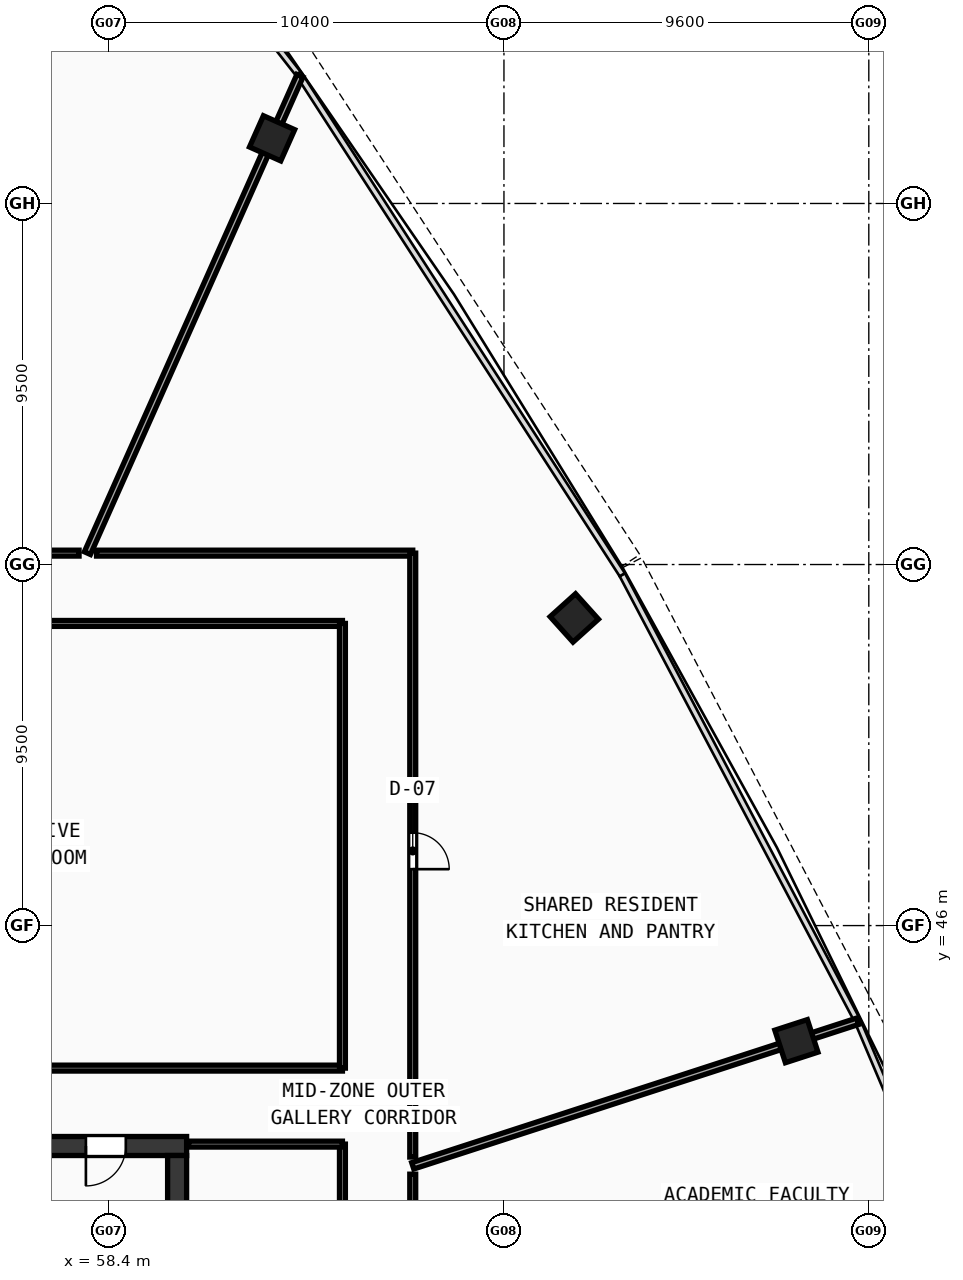
"""IFC4 building model, lengths in metres.
Left out: names, types, materials, properties, quantities, classifications, styles, units other than length and angle.
Written with IfcOpenShell. Run it as: python <this file> out.ifc"""

import sys

from ifc_helpers import new_model, si_unit, direction, frame, frame_2d, origin, origin_with_axes, origin_2d, place, context, subcontext, project, spatial, rectangle, hollow_rectangle, extrude, source, transform, mapped, element, fill, save


model = new_model("IFC4")
c1 = context("Model", 3, precision=1e-05, world=origin(), true_north=direction((0.0, 1.0)))
c2 = subcontext(c1, "Body", "Model", "MODEL_VIEW")
j1 = project(units=[si_unit("LENGTHUNIT", "METRE"), si_unit("PLANEANGLEUNIT", "RADIAN")], contexts=[c1])
p1 = place(None, origin())
s1 = spatial("IfcSite", under=j1, at=p1, CompositionType="ELEMENT")
p2 = place(p1, origin())
s2 = spatial("IfcBuilding", under=s1, at=p2, CompositionType="ELEMENT")
p3 = place(p2, frame((0.0, 0.0, 203.76)))
s3 = spatial("IfcBuildingStorey", under=s2, at=p3, CompositionType="ELEMENT", Elevation=203.76)
p4 = place(p3, frame((49.2, 40.2, 0.0), z_axis=(0.0, 0.0, 1.0), x_axis=(1.0, 0.0, 0.0)))
e1 = element("IfcWall", 1, at=p4, inside=s3, PredefinedType="SHEAR", context=c2, shape_type="SweptSolid", body=[
    extrude(rectangle(XDim=11.25, YDim=0.5, at=frame_2d((5.625, 0.0))), origin(), (0.0, 0.0, 1.0), 3.54),
])
p5 = place(p4, frame((8.6, 0.0, 0.0)))
e2 = element("IfcOpeningElement", 2, at=p5, cuts=e1, PredefinedType="OPENING", context=c2, shape_type="SweptSolid", body=[
    extrude(rectangle(XDim=1.05, YDim=2.1, at=frame_2d((0.525, 1.05))), frame((0.0, 0.26, 0.0), z_axis=(0.0, -1.0, 0.0), x_axis=(1.0, 0.0, 0.0)), (0.0, 0.0, 1.0), 0.52),
])
p6 = place(p3, frame((60.2, 27.75, 0.0), z_axis=(0.0, 0.0, 1.0), x_axis=(0.0, 1.0, 0.0)))
e3 = element("IfcWall", 3, at=p6, inside=s3, PredefinedType="SHEAR", context=c2, shape_type="SweptSolid", body=[
    extrude(rectangle(XDim=12.2, YDim=0.5, at=frame_2d((6.1, 0.0))), origin(), (0.0, 0.0, 1.0), 3.54),
])
m1 = source(origin(), c2, "Body", "SweptSolid", [
    extrude(hollow_rectangle(XDim=0.9, YDim=0.9, WallThickness=0.036, at=origin_2d()), origin(), (0.0, 0.0, 1.0), 3.8),
])
for number, where, z_axis, x_axis in (
    (4, (76.495, 42.958, -0.26), (0.0, 0.0, 1.0), (-0.309, 0.951, 0.0)),
    (5, (70.651, 54.095, -0.26), (0.0, 0.0, 1.0), (-0.669, 0.743, 0.0)),
    (6, (62.699, 66.715, -0.26), (0.0, 0.0, 1.0), (-0.914, 0.407, 0.0)),
):
    element("IfcColumn", number, at=place(p3, frame(where, z_axis=z_axis, x_axis=x_axis)), inside=s3, PredefinedType="COLUMN", context=c2, shape_type="MappedRepresentation", body=[
        mapped(m1, transform((0.0, 0.0, 0.0), scale=1.0)),
    ])
p7 = place(p3, frame((31.45, 42.25, 0.0), z_axis=(0.0, 0.0, 1.0), x_axis=(1.0, 0.0, 0.0)))
e7 = element("IfcWall", 7, at=p7, inside=s3, PredefinedType="PARTITIONING", context=c2, shape_type="SweptSolid", body=[
    extrude(rectangle(XDim=33.1, YDim=0.155, at=frame_2d((16.55, 0.0))), origin(), (0.0, 0.0, 1.0), 2.89),
])
p8 = place(p3, frame((31.45, 53.95, 0.0), z_axis=(0.0, 0.0, 1.0), x_axis=(1.0, 0.0, 0.0)))
e8 = element("IfcWall", 8, at=p8, inside=s3, PredefinedType="PARTITIONING", context=c2, shape_type="SweptSolid", body=[
    extrude(rectangle(XDim=33.1, YDim=0.155, at=frame_2d((16.55, 0.0))), origin(), (0.0, 0.0, 1.0), 2.89),
])
p9 = place(p8, frame((8.0, 0.0, 0.0)))
e9 = element("IfcOpeningElement", 9, at=p9, cuts=e8, PredefinedType="OPENING", context=c2, shape_type="SweptSolid", body=[
    extrude(rectangle(XDim=0.92, YDim=2.1, at=frame_2d((0.46, 1.05))), frame((0.0, 0.087, 0.0), z_axis=(0.0, -1.0, 0.0), x_axis=(1.0, 0.0, 0.0)), (0.0, 0.0, 1.0), 0.175),
])
p10 = place(p8, frame((19.85, 0.0, 0.0)))
e10 = element("IfcOpeningElement", 10, at=p10, cuts=e8, PredefinedType="OPENING", context=c2, shape_type="SweptSolid", body=[
    extrude(rectangle(XDim=0.92, YDim=2.1, at=frame_2d((0.46, 1.05))), frame((0.0, 0.087, 0.0), z_axis=(0.0, -1.0, 0.0), x_axis=(1.0, 0.0, 0.0)), (0.0, 0.0, 1.0), 0.175),
])
p11 = place(p3, frame((64.55, 42.25, 0.0), z_axis=(0.0, 0.0, 1.0), x_axis=(0.0, 1.0, 0.0)))
e11 = element("IfcWall", 11, at=p11, inside=s3, PredefinedType="PARTITIONING", context=c2, shape_type="SweptSolid", body=[
    extrude(rectangle(XDim=11.7, YDim=0.155, at=frame_2d((5.85, 0.0))), origin(), (0.0, 0.0, 1.0), 2.89),
])
p12 = place(p3, frame((64.55, 23.65, 0.0), z_axis=(0.0, 0.0, 1.0), x_axis=(0.0, 1.0, 0.0)))
e12 = element("IfcWall", 12, at=p12, inside=s3, PredefinedType="PARTITIONING", context=c2, shape_type="SweptSolid", body=[
    extrude(rectangle(XDim=16.6, YDim=0.155, at=frame_2d((8.3, 0.0))), origin(), (0.0, 0.0, 1.0), 2.89),
])
p13 = place(p12, frame((7.5, 0.0, 0.0)))
e13 = element("IfcOpeningElement", 13, at=p13, cuts=e12, PredefinedType="OPENING", context=c2, shape_type="SweptSolid", body=[
    extrude(rectangle(XDim=0.9, YDim=2.08, at=frame_2d((0.45, 1.04))), frame((0.0, 0.087, 0.0), z_axis=(0.0, -1.0, 0.0), x_axis=(1.0, 0.0, 0.0)), (0.0, 0.0, 1.0), 0.175),
])
p14 = place(p3, frame((60.5, 40.25, 0.0), z_axis=(0.0, 0.0, 1.0), x_axis=(1.0, 0.0, 0.0)))
e14 = element("IfcWall", 14, at=p14, inside=s3, PredefinedType="PARTITIONING", context=c2, shape_type="SweptSolid", body=[
    extrude(rectangle(XDim=4.05, YDim=0.155, at=frame_2d((2.025, 0.0))), origin(), (0.0, 0.0, 1.0), 3.54),
])
p15 = place(p3, frame((66.4, 39.678, 0.0), z_axis=(0.0, 0.0, 1.0), x_axis=(0.951057676857, 0.309013422511, 0.0)))
e15 = element("IfcWall", 15, at=p15, inside=s3, PredefinedType="PARTITIONING", context=c2, shape_type="SweptSolid", body=[
    extrude(rectangle(XDim=12.31, YDim=0.175, at=frame_2d((6.155, 0.0))), origin(), (0.0, 0.0, 1.0), 2.89),
])
p16 = place(p3, frame((57.84, 55.8, 0.0), z_axis=(0.0, 0.0, 1.0), x_axis=(0.406733161266, 0.913547007836, 0.0)))
e16 = element("IfcWall", 16, at=p16, inside=s3, PredefinedType="PARTITIONING", context=c2, shape_type="SweptSolid", body=[
    extrude(rectangle(XDim=13.749, YDim=0.175, at=frame_2d((6.875, 0.0))), origin(), (0.0, 0.0, 1.0), 2.89),
])
p17 = place(p3, frame((52.391, 55.8, 0.0), z_axis=(0.0, 0.0, 1.0), x_axis=(1.0, 0.0, 0.0)))
e17 = element("IfcWall", 17, at=p17, inside=s3, PredefinedType="PARTITIONING", context=c2, shape_type="SweptSolid", body=[
    extrude(rectangle(XDim=5.229, YDim=0.155, at=frame_2d((2.614, 0.0))), origin(), (0.0, 0.0, 1.0), 2.89),
])
p18 = place(p3, frame((58.08, 55.8, 0.0), z_axis=(0.0, 0.0, 1.0), x_axis=(1.0, 0.0, 0.0)))
e18 = element("IfcWall", 18, at=p18, inside=s3, PredefinedType="PARTITIONING", context=c2, shape_type="SweptSolid", body=[
    extrude(rectangle(XDim=8.32, YDim=0.155, at=frame_2d((4.16, 0.0))), origin(), (0.0, 0.0, 1.0), 3.14),
])
p19 = place(p3, frame((66.4, 55.8, 0.0), z_axis=(0.0, 0.0, 1.0), x_axis=(0.0, -1.0, 0.0)))
e19 = element("IfcWall", 19, at=p19, inside=s3, PredefinedType="PARTITIONING", context=c2, shape_type="SweptSolid", body=[
    extrude(rectangle(XDim=15.89, YDim=0.155, at=frame_2d((7.945, 0.0))), origin(), (0.0, 0.0, 1.0), 2.89),
])
p20 = place(p19, frame((7.356, 0.0, 0.0)))
e20 = element("IfcOpeningElement", 20, at=p20, cuts=e19, PredefinedType="OPENING", context=c2, shape_type="SweptSolid", body=[
    extrude(rectangle(XDim=0.96, YDim=2.12, at=frame_2d((0.48, 1.06))), frame((0.0, 0.087, 0.0), z_axis=(0.0, -1.0, 0.0), x_axis=(1.0, 0.0, 0.0)), (0.0, 0.0, 1.0), 0.175),
])
p21 = place(p3, frame((66.4, 39.459, 0.0), z_axis=(0.0, 0.0, 1.0), x_axis=(0.0, -1.0, 0.0)))
e21 = element("IfcWall", 21, at=p21, inside=s3, PredefinedType="PARTITIONING", context=c2, shape_type="SweptSolid", body=[
    extrude(rectangle(XDim=4.896, YDim=0.155, at=frame_2d((2.448, 0.0))), origin(), (0.0, 0.0, 1.0), 3.14),
])
p22 = place(p21, frame((1.988, 0.0, 0.0)))
e22 = element("IfcOpeningElement", 22, at=p22, cuts=e21, PredefinedType="OPENING", context=c2, shape_type="SweptSolid", body=[
    extrude(rectangle(XDim=0.92, YDim=2.1, at=frame_2d((0.46, 1.05))), frame((0.0, 0.087, 0.0), z_axis=(0.0, -1.0, 0.0), x_axis=(1.0, 0.0, 0.0)), (0.0, 0.0, 1.0), 0.175),
])
m2 = source(origin(), c2, "Body", "SweptSolid", [
    extrude(rectangle(XDim=1.05, YDim=2.1, at=frame_2d((0.525, 1.05))), frame((0.0, 0.025, 0.0), z_axis=(0.0, -1.0, 0.0), x_axis=(1.0, 0.0, 0.0)), (0.0, 0.0, 1.0), 0.05),
])
p23 = place(p5, frame((1.05, 0.0, 0.0), z_axis=(0.0, 0.0, 1.0), x_axis=(-1.0, 0.0, 0.0)))
e23 = element("IfcDoor", 23, at=p23, inside=s3, OperationType="SINGLE_SWING_RIGHT", PredefinedType="DOOR", context=c2, shape_type="MappedRepresentation", body=[
    mapped(m2, transform((0.0, 0.0, 0.0), scale=1.0)),
])
fill(e2, e23)
m3 = source(origin(), c2, "Body", "SweptSolid", [
    extrude(rectangle(XDim=0.96, YDim=2.12, at=frame_2d((0.48, 1.06))), frame((0.0, 0.025, 0.0), z_axis=(0.0, -1.0, 0.0), x_axis=(1.0, 0.0, 0.0)), (0.0, 0.0, 1.0), 0.05),
])
p24 = place(p20, origin_with_axes())
e24 = element("IfcDoor", 24, at=p24, inside=s3, OperationType="SINGLE_SWING_RIGHT", PredefinedType="DOOR", context=c2, shape_type="MappedRepresentation", body=[
    mapped(m3, transform((0.0, 0.0, 0.0), scale=1.0)),
])
fill(e20, e24)
save(model, sys.argv[1])
